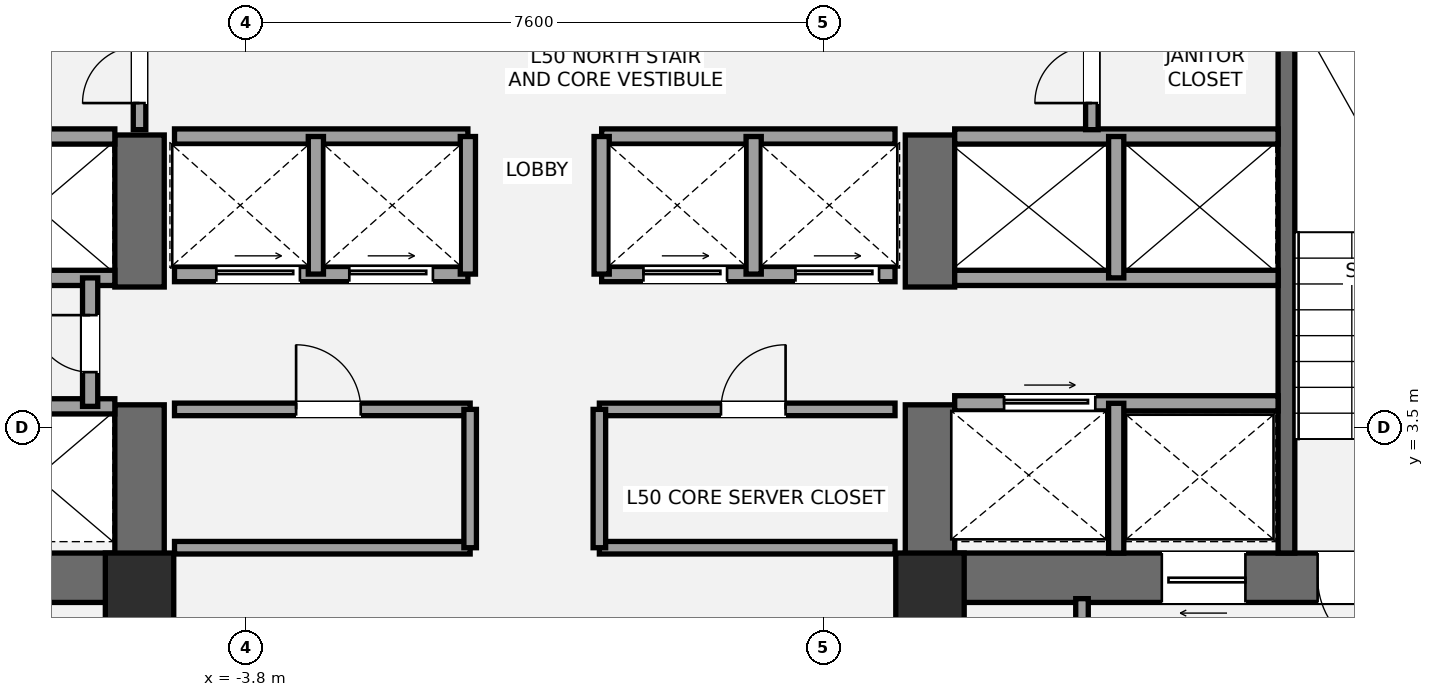
"""IFC4 building model, lengths in metres.
Left out: names, types, materials, properties, quantities, classifications, styles, units other than length and angle.
Written with IfcOpenShell. Run it as: python <this file> out.ifc"""

import sys

from ifc_helpers import new_model, si_unit, direction, frame, frame_2d, origin, origin_2d, place, context, subcontext, project, spatial, rectangle, extrude, element, fill, save


model = new_model("IFC4")
c1 = context("Model", 3, precision=1e-05, world=origin(), true_north=direction((0.0, 1.0)))
c2 = subcontext(c1, "Body", "Model", "MODEL_VIEW")
j1 = project(units=[si_unit("LENGTHUNIT", "METRE"), si_unit("PLANEANGLEUNIT", "RADIAN")], contexts=[c1])
p1 = place(None, origin())
s1 = spatial("IfcSite", under=j1, at=p1, CompositionType="ELEMENT")
p2 = place(p1, origin())
s2 = spatial("IfcBuilding", under=s1, at=p2, CompositionType="ELEMENT")
p3 = place(p2, frame((0.0, 0.0, 182.2)))
s3 = spatial("IfcBuildingStorey", under=s2, at=p3, CompositionType="ELEMENT", Elevation=182.2)
p4 = place(p3, frame((-4.875, 1.525, 0.0), z_axis=(0.0, 0.0, 1.0), x_axis=(-1.0, 0.0, 0.0)))
e1 = element("IfcWall", 1, at=p4, inside=s3, PredefinedType="SHEAR", context=c2, shape_type="SweptSolid", body=[
    extrude(rectangle(XDim=8.925, YDim=0.65, at=frame_2d((4.462, 0.0))), origin(), (0.0, 0.0, 1.0), 3.2),
])
p5 = place(p4, frame((5.425, 0.0, 0.0)))
e2 = element("IfcOpeningElement", 2, at=p5, cuts=e1, PredefinedType="OPENING", context=c2, shape_type="SweptSolid", body=[
    extrude(rectangle(XDim=1.05, YDim=2.15, at=frame_2d((0.525, 1.075))), frame((0.0, 0.335, 0.0), z_axis=(0.0, -1.0, 0.0), x_axis=(1.0, 0.0, 0.0)), (0.0, 0.0, 1.0), 0.67),
])
p6 = place(p4, frame((3.755, 0.0, 0.0)))
e3 = element("IfcOpeningElement", 3, at=p6, cuts=e1, PredefinedType="OPENING", context=c2, shape_type="SweptSolid", body=[
    extrude(rectangle(XDim=1.1, YDim=2.2, at=frame_2d((0.55, 1.1))), frame((0.0, 0.335, 0.0), z_axis=(0.0, -1.0, 0.0), x_axis=(1.0, 0.0, 0.0)), (0.0, 0.0, 1.0), 0.67),
])
p7 = place(p3, frame((-5.2, 1.2, 0.0), z_axis=(0.0, 0.0, 1.0), x_axis=(0.0, 1.0, 0.0)))
e4 = element("IfcWall", 4, at=p7, inside=s3, PredefinedType="SHEAR", context=c2, shape_type="SweptSolid", body=[
    extrude(rectangle(XDim=2.6, YDim=0.65, at=frame_2d((1.3, 0.0))), origin(), (0.0, 0.0, 1.0), 3.2),
])
p8 = place(p3, frame((-5.2, 5.35, 0.0), z_axis=(0.0, 0.0, 1.0), x_axis=(0.0, 1.0, 0.0)))
e5 = element("IfcWall", 5, at=p8, inside=s3, PredefinedType="SHEAR", context=c2, shape_type="SweptSolid", body=[
    extrude(rectangle(XDim=2.0, YDim=0.65, at=frame_2d((1.0, 0.0))), origin(), (0.0, 0.0, 1.0), 3.2),
])
p9 = place(p3, frame((13.8, 1.525, 0.0), z_axis=(0.0, 0.0, 1.0), x_axis=(-1.0, 0.0, 0.0)))
e6 = element("IfcWall", 6, at=p9, inside=s3, PredefinedType="SHEAR", context=c2, shape_type="SweptSolid", body=[
    extrude(rectangle(XDim=8.925, YDim=0.65, at=frame_2d((4.462, 0.0))), origin(), (0.0, 0.0, 1.0), 3.2),
])
p10 = place(p9, frame((2.45, 0.0, 0.0)))
e7 = element("IfcOpeningElement", 7, at=p10, cuts=e6, PredefinedType="OPENING", context=c2, shape_type="SweptSolid", body=[
    extrude(rectangle(XDim=1.05, YDim=2.15, at=frame_2d((0.525, 1.075))), frame((0.0, 0.335, 0.0), z_axis=(0.0, -1.0, 0.0), x_axis=(1.0, 0.0, 0.0)), (0.0, 0.0, 1.0), 0.67),
])
p11 = place(p9, frame((4.45, 0.0, 0.0)))
e8 = element("IfcOpeningElement", 8, at=p11, cuts=e6, PredefinedType="OPENING", context=c2, shape_type="SweptSolid", body=[
    extrude(rectangle(XDim=1.1, YDim=2.2, at=frame_2d((0.55, 1.1))), frame((0.0, 0.335, 0.0), z_axis=(0.0, -1.0, 0.0), x_axis=(1.0, 0.0, 0.0)), (0.0, 0.0, 1.0), 0.67),
])
p12 = place(p3, frame((5.2, 1.2, 0.0), z_axis=(0.0, 0.0, 1.0), x_axis=(0.0, 1.0, 0.0)))
e9 = element("IfcWall", 9, at=p12, inside=s3, PredefinedType="SHEAR", context=c2, shape_type="SweptSolid", body=[
    extrude(rectangle(XDim=2.6, YDim=0.65, at=frame_2d((1.3, 0.0))), origin(), (0.0, 0.0, 1.0), 3.2),
])
p13 = place(p3, frame((5.2, 5.35, 0.0), z_axis=(0.0, 0.0, 1.0), x_axis=(0.0, 1.0, 0.0)))
e10 = element("IfcWall", 10, at=p13, inside=s3, PredefinedType="SHEAR", context=c2, shape_type="SweptSolid", body=[
    extrude(rectangle(XDim=2.0, YDim=0.65, at=frame_2d((1.0, 0.0))), origin(), (0.0, 0.0, 1.0), 3.2),
])
p14 = place(p3, frame((9.89, 1.85, 0.0), z_axis=(0.0, 0.0, 1.0), x_axis=(0.0, 1.0, 0.0)))
e11 = element("IfcWall", 11, at=p14, inside=s3, PredefinedType="SHEAR", context=c2, shape_type="SweptSolid", body=[
    extrude(rectangle(XDim=7.15, YDim=0.22, at=frame_2d((3.575, 0.0))), origin(), (0.0, 0.0, 1.0), 3.2),
])
for number, where, z_axis, x_axis in (
    (12, (-5.2, 1.4, 0.0), (0.0, 0.0, 1.0), (1.0, 0.0, 0.0)),
    (13, (5.2, 1.4, 0.0), (0.0, 0.0, 1.0), (1.0, 0.0, 0.0)),
):
    element("IfcColumn", number, at=place(p3, frame(where, z_axis=z_axis, x_axis=x_axis)), inside=s3, PredefinedType="COLUMN", context=c2, shape_type="SweptSolid", body=[
        extrude(rectangle(XDim=0.9, YDim=0.9, at=origin_2d()), origin(), (0.0, 0.0, 1.0), 3.2),
    ])
p15 = place(p3, frame((-4.95, -2.15, 0.0), z_axis=(0.0, 0.0, 1.0), x_axis=(0.0, 1.0, 0.0)))
e14 = element("IfcWall", 14, at=p15, inside=s3, PredefinedType="SOLIDWALL", context=c2, shape_type="SweptSolid", body=[
    extrude(rectangle(XDim=3.4, YDim=0.2, at=frame_2d((1.7, 0.0))), origin(), (0.0, 0.0, 1.0), 2.473),
])
p16 = place(p15, frame((0.95, 0.0, 0.0)))
e15 = element("IfcOpeningElement", 15, at=p16, cuts=e14, PredefinedType="OPENING", context=c2, shape_type="SweptSolid", body=[
    extrude(rectangle(XDim=0.75, YDim=2.1, at=frame_2d((0.375, 1.05))), frame((0.0, 0.11, 0.0), z_axis=(0.0, -1.0, 0.0), x_axis=(1.0, 0.0, 0.0)), (0.0, 0.0, 1.0), 0.22),
])
p17 = place(p3, frame((7.2, -2.15, 0.0), z_axis=(0.0, 0.0, 1.0), x_axis=(0.0, 1.0, 0.0)))
e16 = element("IfcWall", 16, at=p17, inside=s3, PredefinedType="PARTITIONING", context=c2, shape_type="SweptSolid", body=[
    extrude(rectangle(XDim=3.4, YDim=0.165, at=frame_2d((1.7, 0.0))), origin(), (0.0, 0.0, 1.0), 2.473),
])
p18 = place(p3, frame((4.95, -2.15, 0.0), z_axis=(0.0, 0.0, 1.0), x_axis=(0.0, 1.0, 0.0)))
e17 = element("IfcWall", 17, at=p18, inside=s3, PredefinedType="SOLIDWALL", context=c2, shape_type="SweptSolid", body=[
    extrude(rectangle(XDim=3.4, YDim=0.2, at=frame_2d((1.7, 0.0))), origin(), (0.0, 0.0, 1.0), 2.473),
])
p19 = place(p18, frame((0.95, 0.0, 0.0)))
e18 = element("IfcOpeningElement", 18, at=p19, cuts=e17, PredefinedType="OPENING", context=c2, shape_type="SweptSolid", body=[
    extrude(rectangle(XDim=0.75, YDim=2.1, at=frame_2d((0.375, 1.05))), frame((0.0, 0.11, 0.0), z_axis=(0.0, -1.0, 0.0), x_axis=(1.0, 0.0, 0.0)), (0.0, 0.0, 1.0), 0.22),
])
for number, where, z_axis, x_axis in (
    (19, (-9.78, 3.78, 0.0), (0.0, 0.0, 1.0), (1.0, 0.0, 0.0)),
    (20, (-9.78, 5.47, 0.0), (0.0, 0.0, 1.0), (1.0, 0.0, 0.0)),
    (21, (-9.78, 7.33, 0.0), (0.0, 0.0, 1.0), (1.0, 0.0, 0.0)),
):
    element("IfcWall", number, at=place(p3, frame(where, z_axis=z_axis, x_axis=x_axis)), inside=s3, PredefinedType="SOLIDWALL", context=c2, shape_type="SweptSolid", body=[
        extrude(rectangle(XDim=4.255, YDim=0.2, at=frame_2d((2.127, 0.0))), origin(), (0.0, 0.0, 1.0), 3.02),
    ])
p20 = place(p3, frame((-5.85, 3.78, 0.0), z_axis=(0.0, 0.0, 1.0), x_axis=(0.0, 1.0, 0.0)))
e22 = element("IfcWall", 22, at=p20, inside=s3, PredefinedType="SOLIDWALL", context=c2, shape_type="SweptSolid", body=[
    extrude(rectangle(XDim=1.69, YDim=0.2, at=frame_2d((0.845, 0.0))), origin(), (0.0, 0.0, 1.0), 3.02),
])
p21 = place(p20, frame((0.45, 0.0, 0.0)))
e23 = element("IfcOpeningElement", 23, at=p21, cuts=e22, PredefinedType="OPENING", context=c2, shape_type="SweptSolid", body=[
    extrude(rectangle(XDim=0.75, YDim=2.1, at=frame_2d((0.375, 1.05))), frame((0.0, 0.11, 0.0), z_axis=(0.0, -1.0, 0.0), x_axis=(1.0, 0.0, 0.0)), (0.0, 0.0, 1.0), 0.22),
])
p22 = place(p3, frame((5.525, 3.82, 0.0), z_axis=(0.0, 0.0, 1.0), x_axis=(1.0, 0.0, 0.0)))
e24 = element("IfcWall", 24, at=p22, inside=s3, PredefinedType="SOLIDWALL", context=c2, shape_type="SweptSolid", body=[
    extrude(rectangle(XDim=4.255, YDim=0.2, at=frame_2d((2.127, 0.0))), origin(), (0.0, 0.0, 1.0), 3.02),
])
p23 = place(p22, frame((0.65, 0.0, 0.0)))
e25 = element("IfcOpeningElement", 25, at=p23, cuts=e24, PredefinedType="OPENING", context=c2, shape_type="SweptSolid", body=[
    extrude(rectangle(XDim=1.2, YDim=2.2, at=frame_2d((0.6, 1.1))), frame((0.0, 0.11, 0.0), z_axis=(0.0, -1.0, 0.0), x_axis=(1.0, 0.0, 0.0)), (0.0, 0.0, 1.0), 0.22),
])
p24 = place(p3, frame((7.65, 1.85, 0.0), z_axis=(0.0, 0.0, 1.0), x_axis=(0.0, 1.0, 0.0)))
e26 = element("IfcWall", 26, at=p24, inside=s3, PredefinedType="SOLIDWALL", context=c2, shape_type="SweptSolid", body=[
    extrude(rectangle(XDim=1.97, YDim=0.2, at=frame_2d((0.985, 0.0))), origin(), (0.0, 0.0, 1.0), 3.02),
])
for number, where, z_axis, x_axis in (
    (27, (5.525, 5.47, 0.0), (0.0, 0.0, 1.0), (1.0, 0.0, 0.0)),
    (28, (5.525, 7.33, 0.0), (0.0, 0.0, 1.0), (1.0, 0.0, 0.0)),
):
    element("IfcWall", number, at=place(p3, frame(where, z_axis=z_axis, x_axis=x_axis)), inside=s3, PredefinedType="SOLIDWALL", context=c2, shape_type="SweptSolid", body=[
        extrude(rectangle(XDim=4.255, YDim=0.2, at=frame_2d((2.127, 0.0))), origin(), (0.0, 0.0, 1.0), 3.02),
    ])
p25 = place(p3, frame((7.65, 5.47, 0.0), z_axis=(0.0, 0.0, 1.0), x_axis=(0.0, 1.0, 0.0)))
e29 = element("IfcWall", 29, at=p25, inside=s3, PredefinedType="SOLIDWALL", context=c2, shape_type="SweptSolid", body=[
    extrude(rectangle(XDim=1.86, YDim=0.2, at=frame_2d((0.93, 0.0))), origin(), (0.0, 0.0, 1.0), 3.02),
])
p26 = place(p3, frame((-4.74, 1.92, 0.0), z_axis=(0.0, 0.0, 1.0), x_axis=(1.0, 0.0, 0.0)))
e30 = element("IfcWall", 30, at=p26, inside=s3, PredefinedType="PARTITIONING", context=c2, shape_type="SweptSolid", body=[
    extrude(rectangle(XDim=3.89, YDim=0.165, at=frame_2d((1.945, 0.0))), origin(), (0.0, 0.0, 1.0), 2.16),
])
p27 = place(p3, frame((-4.74, 3.74, 0.0), z_axis=(0.0, 0.0, 1.0), x_axis=(1.0, 0.0, 0.0)))
e31 = element("IfcWall", 31, at=p27, inside=s3, PredefinedType="PARTITIONING", context=c2, shape_type="SweptSolid", body=[
    extrude(rectangle(XDim=3.89, YDim=0.165, at=frame_2d((1.945, 0.0))), origin(), (0.0, 0.0, 1.0), 3.02),
])
p28 = place(p27, frame((1.6, 0.0, 0.0)))
e32 = element("IfcOpeningElement", 32, at=p28, cuts=e31, PredefinedType="OPENING", context=c2, shape_type="SweptSolid", body=[
    extrude(rectangle(XDim=0.85, YDim=2.1, at=frame_2d((0.425, 1.05))), frame((0.0, 0.093, 0.0), z_axis=(0.0, -1.0, 0.0), x_axis=(1.0, 0.0, 0.0)), (0.0, 0.0, 1.0), 0.185),
])
p29 = place(p3, frame((-0.85, 1.92, 0.0), z_axis=(0.0, 0.0, 1.0), x_axis=(0.0, 1.0, 0.0)))
e33 = element("IfcWall", 33, at=p29, inside=s3, PredefinedType="PARTITIONING", context=c2, shape_type="SweptSolid", body=[
    extrude(rectangle(XDim=1.82, YDim=0.165, at=frame_2d((0.91, 0.0))), origin(), (0.0, 0.0, 1.0), 3.02),
])
p30 = place(p3, frame((0.85, 1.92, 0.0), z_axis=(0.0, 0.0, 1.0), x_axis=(1.0, 0.0, 0.0)))
e34 = element("IfcWall", 34, at=p30, inside=s3, PredefinedType="PARTITIONING", context=c2, shape_type="SweptSolid", body=[
    extrude(rectangle(XDim=3.89, YDim=0.165, at=frame_2d((1.945, 0.0))), origin(), (0.0, 0.0, 1.0), 2.16),
])
p31 = place(p3, frame((0.85, 3.74, 0.0), z_axis=(0.0, 0.0, 1.0), x_axis=(1.0, 0.0, 0.0)))
e35 = element("IfcWall", 35, at=p31, inside=s3, PredefinedType="PARTITIONING", context=c2, shape_type="SweptSolid", body=[
    extrude(rectangle(XDim=3.89, YDim=0.165, at=frame_2d((1.945, 0.0))), origin(), (0.0, 0.0, 1.0), 3.02),
])
p32 = place(p31, frame((1.6, 0.0, 0.0)))
e36 = element("IfcOpeningElement", 36, at=p32, cuts=e35, PredefinedType="OPENING", context=c2, shape_type="SweptSolid", body=[
    extrude(rectangle(XDim=0.85, YDim=2.1, at=frame_2d((0.425, 1.05))), frame((0.0, 0.093, 0.0), z_axis=(0.0, -1.0, 0.0), x_axis=(1.0, 0.0, 0.0)), (0.0, 0.0, 1.0), 0.185),
])
p33 = place(p3, frame((0.85, 1.92, 0.0), z_axis=(0.0, 0.0, 1.0), x_axis=(0.0, 1.0, 0.0)))
e37 = element("IfcWall", 37, at=p33, inside=s3, PredefinedType="PARTITIONING", context=c2, shape_type="SweptSolid", body=[
    extrude(rectangle(XDim=1.82, YDim=0.165, at=frame_2d((0.91, 0.0))), origin(), (0.0, 0.0, 1.0), 3.02),
])
p34 = place(p3, frame((-4.74, 5.52, 0.0), z_axis=(0.0, 0.0, 1.0), x_axis=(1.0, 0.0, 0.0)))
e38 = element("IfcWall", 38, at=p34, inside=s3, PredefinedType="SOLIDWALL", context=c2, shape_type="SweptSolid", body=[
    extrude(rectangle(XDim=3.86, YDim=0.2, at=frame_2d((1.93, 0.0))), origin(), (0.0, 0.0, 1.0), 3.02),
])
p35 = place(p34, frame((0.55, 0.0, 0.0)))
e39 = element("IfcOpeningElement", 39, at=p35, cuts=e38, PredefinedType="OPENING", context=c2, shape_type="SweptSolid", body=[
    extrude(rectangle(XDim=1.1, YDim=2.2, at=frame_2d((0.55, 1.1))), frame((0.0, 0.11, 0.0), z_axis=(0.0, -1.0, 0.0), x_axis=(1.0, 0.0, 0.0)), (0.0, 0.0, 1.0), 0.22),
])
p36 = place(p34, frame((2.3, 0.0, 0.0)))
e40 = element("IfcOpeningElement", 40, at=p36, cuts=e38, PredefinedType="OPENING", context=c2, shape_type="SweptSolid", body=[
    extrude(rectangle(XDim=1.1, YDim=2.2, at=frame_2d((0.55, 1.1))), frame((0.0, 0.11, 0.0), z_axis=(0.0, -1.0, 0.0), x_axis=(1.0, 0.0, 0.0)), (0.0, 0.0, 1.0), 0.22),
])
p37 = place(p3, frame((0.88, 5.52, 0.0), z_axis=(0.0, 0.0, 1.0), x_axis=(1.0, 0.0, 0.0)))
e41 = element("IfcWall", 41, at=p37, inside=s3, PredefinedType="SOLIDWALL", context=c2, shape_type="SweptSolid", body=[
    extrude(rectangle(XDim=3.86, YDim=0.2, at=frame_2d((1.93, 0.0))), origin(), (0.0, 0.0, 1.0), 3.02),
])
p38 = place(p37, frame((0.55, 0.0, 0.0)))
e42 = element("IfcOpeningElement", 42, at=p38, cuts=e41, PredefinedType="OPENING", context=c2, shape_type="SweptSolid", body=[
    extrude(rectangle(XDim=1.1, YDim=2.2, at=frame_2d((0.55, 1.1))), frame((0.0, 0.11, 0.0), z_axis=(0.0, -1.0, 0.0), x_axis=(1.0, 0.0, 0.0)), (0.0, 0.0, 1.0), 0.22),
])
p39 = place(p37, frame((2.55, 0.0, 0.0)))
e43 = element("IfcOpeningElement", 43, at=p39, cuts=e41, PredefinedType="OPENING", context=c2, shape_type="SweptSolid", body=[
    extrude(rectangle(XDim=1.1, YDim=2.2, at=frame_2d((0.55, 1.1))), frame((0.0, 0.11, 0.0), z_axis=(0.0, -1.0, 0.0), x_axis=(1.0, 0.0, 0.0)), (0.0, 0.0, 1.0), 0.22),
])
for number, where, z_axis, x_axis in (
    (44, (-4.74, 7.33, 0.0), (0.0, 0.0, 1.0), (1.0, 0.0, 0.0)),
    (45, (0.88, 7.33, 0.0), (0.0, 0.0, 1.0), (1.0, 0.0, 0.0)),
):
    element("IfcWall", number, at=place(p3, frame(where, z_axis=z_axis, x_axis=x_axis)), inside=s3, PredefinedType="SOLIDWALL", context=c2, shape_type="SweptSolid", body=[
        extrude(rectangle(XDim=3.86, YDim=0.2, at=frame_2d((1.93, 0.0))), origin(), (0.0, 0.0, 1.0), 3.02),
    ])
for number, where, z_axis, x_axis in (
    (46, (-2.88, 5.52, 0.0), (0.0, 0.0, 1.0), (0.0, 1.0, 0.0)),
    (47, (2.88, 5.52, 0.0), (0.0, 0.0, 1.0), (0.0, 1.0, 0.0)),
    (48, (-0.88, 5.52, 0.0), (0.0, 0.0, 1.0), (0.0, 1.0, 0.0)),
    (49, (0.88, 5.52, 0.0), (0.0, 0.0, 1.0), (0.0, 1.0, 0.0)),
):
    element("IfcWall", number, at=place(p3, frame(where, z_axis=z_axis, x_axis=x_axis)), inside=s3, PredefinedType="SOLIDWALL", context=c2, shape_type="SweptSolid", body=[
        extrude(rectangle(XDim=1.81, YDim=0.2, at=frame_2d((0.905, 0.0))), origin(), (0.0, 0.0, 1.0), 3.02),
    ])
p40 = place(p3, frame((-5.2, 7.42, 0.0), z_axis=(0.0, 0.0, 1.0), x_axis=(0.0, 1.0, 0.0)))
e50 = element("IfcWall", 50, at=p40, inside=s3, PredefinedType="PARTITIONING", context=c2, shape_type="SweptSolid", body=[
    extrude(rectangle(XDim=1.58, YDim=0.165, at=frame_2d((0.79, 0.0))), origin(), (0.0, 0.0, 1.0), 3.02),
])
p41 = place(p40, frame((0.35, 0.0, 0.0)))
e51 = element("IfcOpeningElement", 51, at=p41, cuts=e50, PredefinedType="OPENING", context=c2, shape_type="SweptSolid", body=[
    extrude(rectangle(XDim=0.75, YDim=2.1, at=frame_2d((0.375, 1.05))), frame((0.0, 0.093, 0.0), z_axis=(0.0, -1.0, 0.0), x_axis=(1.0, 0.0, 0.0)), (0.0, 0.0, 1.0), 0.185),
])
p42 = place(p3, frame((7.33, 7.42, 0.0), z_axis=(0.0, 0.0, 1.0), x_axis=(0.0, 1.0, 0.0)))
e52 = element("IfcWall", 52, at=p42, inside=s3, PredefinedType="PARTITIONING", context=c2, shape_type="SweptSolid", body=[
    extrude(rectangle(XDim=1.58, YDim=0.165, at=frame_2d((0.79, 0.0))), origin(), (0.0, 0.0, 1.0), 3.02),
])
p43 = place(p42, frame((0.35, 0.0, 0.0)))
e53 = element("IfcOpeningElement", 53, at=p43, cuts=e52, PredefinedType="OPENING", context=c2, shape_type="SweptSolid", body=[
    extrude(rectangle(XDim=0.75, YDim=2.1, at=frame_2d((0.375, 1.05))), frame((0.0, 0.093, 0.0), z_axis=(0.0, -1.0, 0.0), x_axis=(1.0, 0.0, 0.0)), (0.0, 0.0, 1.0), 0.185),
])
p44 = place(p10, origin())
e54 = element("IfcDoor", 54, at=p44, inside=s3, OperationType="SINGLE_SWING_LEFT", PredefinedType="DOOR", context=c2, shape_type="SweptSolid", body=[
    extrude(rectangle(XDim=1.05, YDim=2.15, at=frame_2d((0.525, 1.075))), frame((0.0, 0.025, 0.0), z_axis=(0.0, -1.0, 0.0), x_axis=(1.0, 0.0, 0.0)), (0.0, 0.0, 1.0), 0.05),
])
fill(e7, e54)
p45 = place(p21, origin())
e55 = element("IfcDoor", 55, at=p45, inside=s3, OperationType="SINGLE_SWING_RIGHT", PredefinedType="DOOR", context=c2, shape_type="SweptSolid", body=[
    extrude(rectangle(XDim=0.75, YDim=2.1, at=frame_2d((0.375, 1.05))), frame((0.0, 0.025, 0.0), z_axis=(0.0, -1.0, 0.0), x_axis=(1.0, 0.0, 0.0)), (0.0, 0.0, 1.0), 0.05),
])
fill(e23, e55)
p46 = place(p11, origin())
e56 = element("IfcDoor", 56, at=p46, inside=s3, OperationType="SLIDING_TO_LEFT", PredefinedType="DOOR", context=c2, shape_type="SweptSolid", body=[
    extrude(rectangle(XDim=1.1, YDim=2.2, at=frame_2d((0.55, 1.1))), frame((0.0, 0.025, 0.0), z_axis=(0.0, -1.0, 0.0), x_axis=(1.0, 0.0, 0.0)), (0.0, 0.0, 1.0), 0.05),
])
fill(e8, e56)
p47 = place(p23, origin())
e57 = element("IfcDoor", 57, at=p47, inside=s3, OperationType="SLIDING_TO_RIGHT", PredefinedType="DOOR", context=c2, shape_type="SweptSolid", body=[
    extrude(rectangle(XDim=1.2, YDim=2.2, at=frame_2d((0.6, 1.1))), frame((0.0, 0.025, 0.0), z_axis=(0.0, -1.0, 0.0), x_axis=(1.0, 0.0, 0.0)), (0.0, 0.0, 1.0), 0.05),
])
fill(e25, e57)
p48 = place(p28, origin())
e58 = element("IfcDoor", 58, at=p48, inside=s3, OperationType="SINGLE_SWING_LEFT", PredefinedType="DOOR", context=c2, shape_type="SweptSolid", body=[
    extrude(rectangle(XDim=0.85, YDim=2.1, at=frame_2d((0.425, 1.05))), frame((0.0, 0.025, 0.0), z_axis=(0.0, -1.0, 0.0), x_axis=(1.0, 0.0, 0.0)), (0.0, 0.0, 1.0), 0.05),
])
fill(e32, e58)
p49 = place(p32, origin())
e59 = element("IfcDoor", 59, at=p49, inside=s3, OperationType="SINGLE_SWING_RIGHT", PredefinedType="DOOR", context=c2, shape_type="SweptSolid", body=[
    extrude(rectangle(XDim=0.85, YDim=2.1, at=frame_2d((0.425, 1.05))), frame((0.0, 0.025, 0.0), z_axis=(0.0, -1.0, 0.0), x_axis=(1.0, 0.0, 0.0)), (0.0, 0.0, 1.0), 0.05),
])
fill(e36, e59)
p50 = place(p35, origin())
e60 = element("IfcDoor", 60, at=p50, inside=s3, OperationType="SLIDING_TO_LEFT", PredefinedType="DOOR", context=c2, shape_type="SweptSolid", body=[
    extrude(rectangle(XDim=1.1, YDim=2.2, at=frame_2d((0.55, 1.1))), frame((0.0, 0.025, 0.0), z_axis=(0.0, -1.0, 0.0), x_axis=(1.0, 0.0, 0.0)), (0.0, 0.0, 1.0), 0.05),
])
fill(e39, e60)
p51 = place(p36, origin())
e61 = element("IfcDoor", 61, at=p51, inside=s3, OperationType="SLIDING_TO_LEFT", PredefinedType="DOOR", context=c2, shape_type="SweptSolid", body=[
    extrude(rectangle(XDim=1.1, YDim=2.2, at=frame_2d((0.55, 1.1))), frame((0.0, 0.025, 0.0), z_axis=(0.0, -1.0, 0.0), x_axis=(1.0, 0.0, 0.0)), (0.0, 0.0, 1.0), 0.05),
])
fill(e40, e61)
p52 = place(p38, origin())
e62 = element("IfcDoor", 62, at=p52, inside=s3, OperationType="SLIDING_TO_LEFT", PredefinedType="DOOR", context=c2, shape_type="SweptSolid", body=[
    extrude(rectangle(XDim=1.1, YDim=2.2, at=frame_2d((0.55, 1.1))), frame((0.0, 0.025, 0.0), z_axis=(0.0, -1.0, 0.0), x_axis=(1.0, 0.0, 0.0)), (0.0, 0.0, 1.0), 0.05),
])
fill(e42, e62)
p53 = place(p39, origin())
e63 = element("IfcDoor", 63, at=p53, inside=s3, OperationType="SLIDING_TO_LEFT", PredefinedType="DOOR", context=c2, shape_type="SweptSolid", body=[
    extrude(rectangle(XDim=1.1, YDim=2.2, at=frame_2d((0.55, 1.1))), frame((0.0, 0.025, 0.0), z_axis=(0.0, -1.0, 0.0), x_axis=(1.0, 0.0, 0.0)), (0.0, 0.0, 1.0), 0.05),
])
fill(e43, e63)
p54 = place(p41, origin())
e64 = element("IfcDoor", 64, at=p54, inside=s3, OperationType="SINGLE_SWING_LEFT", PredefinedType="DOOR", context=c2, shape_type="SweptSolid", body=[
    extrude(rectangle(XDim=0.75, YDim=2.1, at=frame_2d((0.375, 1.05))), frame((0.0, 0.025, 0.0), z_axis=(0.0, -1.0, 0.0), x_axis=(1.0, 0.0, 0.0)), (0.0, 0.0, 1.0), 0.05),
])
fill(e51, e64)
p55 = place(p43, origin())
e65 = element("IfcDoor", 65, at=p55, inside=s3, OperationType="SINGLE_SWING_LEFT", PredefinedType="DOOR", context=c2, shape_type="SweptSolid", body=[
    extrude(rectangle(XDim=0.75, YDim=2.1, at=frame_2d((0.375, 1.05))), frame((0.0, 0.025, 0.0), z_axis=(0.0, -1.0, 0.0), x_axis=(1.0, 0.0, 0.0)), (0.0, 0.0, 1.0), 0.05),
])
fill(e53, e65)
save(model, sys.argv[1])
